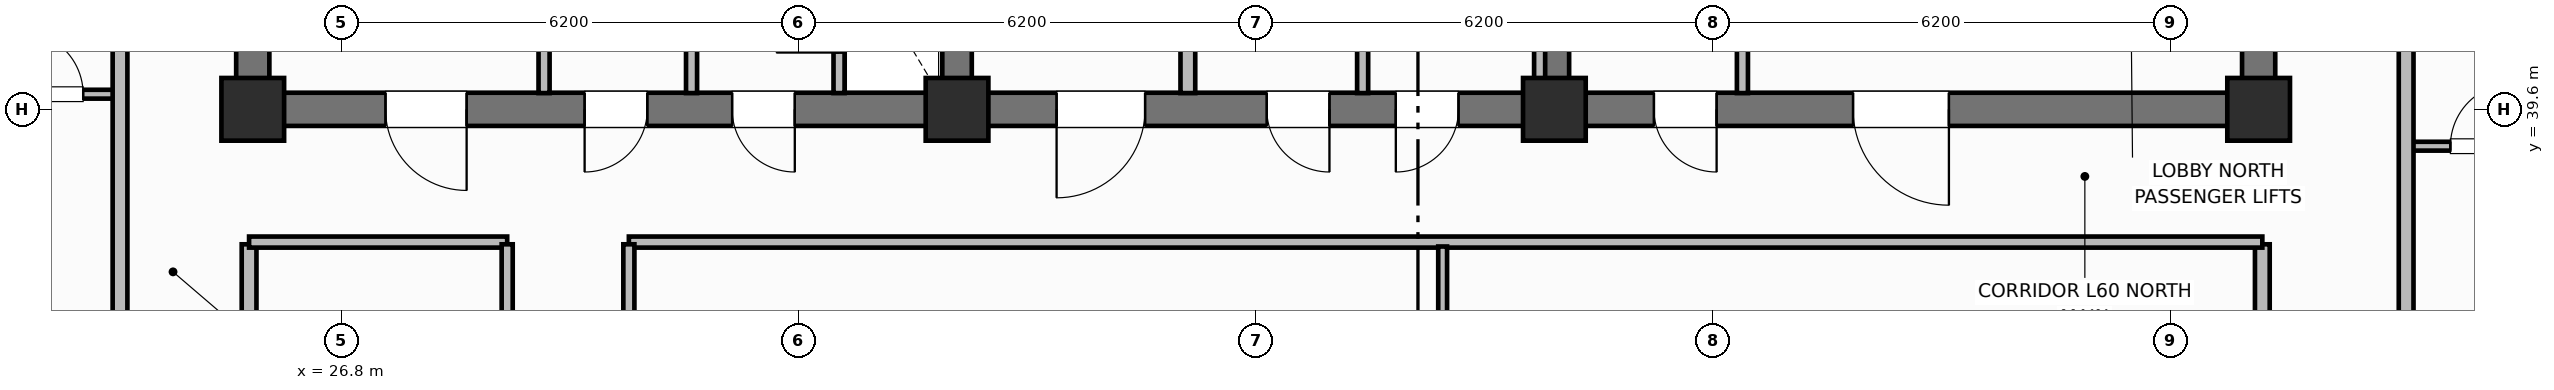
"""IFC4 building model, lengths in metres.
Left out: names, types, materials, properties, quantities, classifications, styles, units other than length and angle.
Written with IfcOpenShell. Run it as: python <this file> out.ifc"""

import sys

from ifc_helpers import new_model, si_unit, direction, frame, frame_2d, origin, origin_2d, place, context, subcontext, project, spatial, rectangle, extrude, element, fill, save


model = new_model("IFC4")
c1 = context("Model", 3, precision=1e-05, world=origin(), true_north=direction((0.0, 1.0)))
c2 = subcontext(c1, "Body", "Model", "MODEL_VIEW")
j1 = project(units=[si_unit("LENGTHUNIT", "METRE"), si_unit("PLANEANGLEUNIT", "RADIAN")], contexts=[c1])
p1 = place(None, origin())
s1 = spatial("IfcSite", under=j1, at=p1, CompositionType="ELEMENT")
p2 = place(p1, origin())
s2 = spatial("IfcBuilding", under=s1, at=p2, CompositionType="ELEMENT")
p3 = place(p2, frame((0.0, 0.0, 240.6)))
s3 = spatial("IfcBuildingStorey", under=s2, at=p3, CompositionType="ELEMENT", Elevation=240.6)
for number, where, z_axis, x_axis in (
    (1, (25.6, 39.825, 0.0), (0.0, 0.0, 1.0), (0.0, 1.0, 0.0)),
    (2, (52.8, 39.825, 0.0), (0.0, 0.0, 1.0), (0.0, 1.0, 0.0)),
):
    element("IfcWall", number, at=place(p3, frame(where, z_axis=z_axis, x_axis=x_axis)), inside=s3, PredefinedType="SHEAR", context=c2, shape_type="SweptSolid", body=[
        extrude(rectangle(XDim=5.75, YDim=0.45, at=frame_2d((2.875, 0.0))), origin(), (0.0, 0.0, 1.0), 3.7),
    ])
p4 = place(p3, frame((52.8, 39.6, 0.0), z_axis=(0.0, 0.0, 1.0), x_axis=(-1.0, 0.0, 0.0)))
e3 = element("IfcWall", 3, at=p4, inside=s3, PredefinedType="SHEAR", context=c2, shape_type="SweptSolid", body=[
    extrude(rectangle(XDim=27.2, YDim=0.45, at=frame_2d((13.6, 0.0))), origin(), (0.0, 0.0, 1.0), 3.7),
])
p5 = place(p4, frame((24.3, 0.0, 0.0)))
e4 = element("IfcOpeningElement", 4, at=p5, cuts=e3, PredefinedType="OPENING", context=c2, shape_type="SweptSolid", body=[
    extrude(rectangle(XDim=1.1, YDim=2.15, at=frame_2d((0.55, 1.075))), frame((0.0, 0.235, 0.0), z_axis=(0.0, -1.0, 0.0), x_axis=(1.0, 0.0, 0.0)), (0.0, 0.0, 1.0), 0.47),
])
p6 = place(p4, frame((21.85, 0.0, 0.0)))
e5 = element("IfcOpeningElement", 5, at=p6, cuts=e3, PredefinedType="OPENING", context=c2, shape_type="SweptSolid", body=[
    extrude(rectangle(XDim=0.85, YDim=2.1, at=frame_2d((0.425, 1.05))), frame((0.0, 0.235, 0.0), z_axis=(0.0, -1.0, 0.0), x_axis=(1.0, 0.0, 0.0)), (0.0, 0.0, 1.0), 0.47),
])
p7 = place(p4, frame((19.85, 0.0, 0.0)))
e6 = element("IfcOpeningElement", 6, at=p7, cuts=e3, PredefinedType="OPENING", context=c2, shape_type="SweptSolid", body=[
    extrude(rectangle(XDim=0.85, YDim=2.1, at=frame_2d((0.425, 1.05))), frame((0.0, 0.235, 0.0), z_axis=(0.0, -1.0, 0.0), x_axis=(1.0, 0.0, 0.0)), (0.0, 0.0, 1.0), 0.47),
])
p8 = place(p4, frame((15.1, 0.0, 0.0)))
e7 = element("IfcOpeningElement", 7, at=p8, cuts=e3, PredefinedType="OPENING", context=c2, shape_type="SweptSolid", body=[
    extrude(rectangle(XDim=1.2, YDim=2.15, at=frame_2d((0.6, 1.075))), frame((0.0, 0.235, 0.0), z_axis=(0.0, -1.0, 0.0), x_axis=(1.0, 0.0, 0.0)), (0.0, 0.0, 1.0), 0.47),
])
p9 = place(p4, frame((12.6, 0.0, 0.0)))
e8 = element("IfcOpeningElement", 8, at=p9, cuts=e3, PredefinedType="OPENING", context=c2, shape_type="SweptSolid", body=[
    extrude(rectangle(XDim=0.85, YDim=2.1, at=frame_2d((0.425, 1.05))), frame((0.0, 0.235, 0.0), z_axis=(0.0, -1.0, 0.0), x_axis=(1.0, 0.0, 0.0)), (0.0, 0.0, 1.0), 0.47),
])
p10 = place(p4, frame((10.85, 0.0, 0.0)))
e9 = element("IfcOpeningElement", 9, at=p10, cuts=e3, PredefinedType="OPENING", context=c2, shape_type="SweptSolid", body=[
    extrude(rectangle(XDim=0.85, YDim=2.1, at=frame_2d((0.425, 1.05))), frame((0.0, 0.235, 0.0), z_axis=(0.0, -1.0, 0.0), x_axis=(1.0, 0.0, 0.0)), (0.0, 0.0, 1.0), 0.47),
])
p11 = place(p4, frame((7.35, 0.0, 0.0)))
e10 = element("IfcOpeningElement", 10, at=p11, cuts=e3, PredefinedType="OPENING", context=c2, shape_type="SweptSolid", body=[
    extrude(rectangle(XDim=0.85, YDim=2.1, at=frame_2d((0.425, 1.05))), frame((0.0, 0.235, 0.0), z_axis=(0.0, -1.0, 0.0), x_axis=(1.0, 0.0, 0.0)), (0.0, 0.0, 1.0), 0.47),
])
p12 = place(p4, frame((4.2, 0.0, 0.0)))
e11 = element("IfcOpeningElement", 11, at=p12, cuts=e3, PredefinedType="OPENING", context=c2, shape_type="SweptSolid", body=[
    extrude(rectangle(XDim=1.3, YDim=2.2, at=frame_2d((0.65, 1.1))), frame((0.0, 0.235, 0.0), z_axis=(0.0, -1.0, 0.0), x_axis=(1.0, 0.0, 0.0)), (0.0, 0.0, 1.0), 0.47),
])
for number, where, z_axis, x_axis in (
    (12, (35.15, 39.825, 0.0), (0.0, 0.0, 1.0), (0.0, 1.0, 0.0)),
    (13, (43.25, 39.825, 0.0), (0.0, 0.0, 1.0), (0.0, 1.0, 0.0)),
):
    element("IfcWall", number, at=place(p3, frame(where, z_axis=z_axis, x_axis=x_axis)), inside=s3, PredefinedType="SHEAR", context=c2, shape_type="SweptSolid", body=[
        extrude(rectangle(XDim=5.75, YDim=0.4, at=frame_2d((2.875, 0.0))), origin(), (0.0, 0.0, 1.0), 3.7),
    ])
for number, where, z_axis, x_axis in (
    (14, (25.6, 39.6, 0.0), (0.0, 0.0, 1.0), (1.0, 0.0, 0.0)),
    (15, (35.15, 39.6, 0.0), (0.0, 0.0, 1.0), (1.0, 0.0, 0.0)),
    (16, (43.25, 39.6, 0.0), (0.0, 0.0, 1.0), (1.0, 0.0, 0.0)),
    (17, (52.8, 39.6, 0.0), (0.0, 0.0, 1.0), (1.0, 0.0, 0.0)),
):
    element("IfcColumn", number, at=place(p3, frame(where, z_axis=z_axis, x_axis=x_axis)), inside=s3, PredefinedType="COLUMN", context=c2, shape_type="SweptSolid", body=[
        extrude(rectangle(XDim=0.85, YDim=0.85, at=origin_2d()), origin(), (0.0, 0.0, 1.0), 3.7),
    ])
p13 = place(p3, frame((33.55, 39.82, 0.0), z_axis=(0.0, 0.0, 1.0), x_axis=(0.0, 1.0, 0.0)))
e18 = element("IfcWall", 18, at=p13, inside=s3, PredefinedType="PARTITIONING", context=c2, shape_type="SweptSolid", body=[
    extrude(rectangle(XDim=2.13, YDim=0.15, at=frame_2d((1.065, 0.0))), origin(), (0.0, 0.0, 1.0), 2.56),
])
p14 = place(p13, frame((0.55, 0.0, 0.0)))
e19 = element("IfcOpeningElement", 19, at=p14, cuts=e18, PredefinedType="OPENING", context=c2, shape_type="SweptSolid", body=[
    extrude(rectangle(XDim=0.85, YDim=2.05, at=frame_2d((0.425, 1.025))), frame((0.0, 0.085, 0.0), z_axis=(0.0, -1.0, 0.0), x_axis=(1.0, 0.0, 0.0)), (0.0, 0.0, 1.0), 0.17),
])
for number, where, z_axis, x_axis in (
    (20, (29.55, 39.82, 0.0), (0.0, 0.0, 1.0), (0.0, 1.0, 0.0)),
    (21, (31.55, 39.82, 0.0), (0.0, 0.0, 1.0), (0.0, 1.0, 0.0)),
):
    element("IfcWall", number, at=place(p3, frame(where, z_axis=z_axis, x_axis=x_axis)), inside=s3, PredefinedType="PARTITIONING", context=c2, shape_type="SweptSolid", body=[
        extrude(rectangle(XDim=2.13, YDim=0.15, at=frame_2d((1.065, 0.0))), origin(), (0.0, 0.0, 1.0), 2.56),
    ])
p15 = place(p3, frame((38.28, 39.82, 0.0), z_axis=(0.0, 0.0, 1.0), x_axis=(0.0, 1.0, 0.0)))
e22 = element("IfcWall", 22, at=p15, inside=s3, PredefinedType="PARTITIONING", context=c2, shape_type="SweptSolid", body=[
    extrude(rectangle(XDim=5.63, YDim=0.2, at=frame_2d((2.815, 0.0))), origin(), (0.0, 0.0, 1.0), 2.56),
])
for number, where, z_axis, x_axis in (
    (23, (43.05, 39.82, 0.0), (0.0, 0.0, 1.0), (0.0, 1.0, 0.0)),
    (24, (40.65, 39.82, 0.0), (0.0, 0.0, 1.0), (0.0, 1.0, 0.0)),
    (25, (45.8, 39.82, 0.0), (0.0, 0.0, 1.0), (0.0, 1.0, 0.0)),
):
    element("IfcWall", number, at=place(p3, frame(where, z_axis=z_axis, x_axis=x_axis)), inside=s3, PredefinedType="PARTITIONING", context=c2, shape_type="SweptSolid", body=[
        extrude(rectangle(XDim=5.63, YDim=0.15, at=frame_2d((2.815, 0.0))), origin(), (0.0, 0.0, 1.0), 2.56),
    ])
for number, where, z_axis, x_axis in (
    (26, (25.55, 18.63, 0.0), (0.0, 0.0, 1.0), (0.0, 1.0, 0.0)),
    (27, (52.85, 18.63, 0.0), (0.0, 0.0, 1.0), (0.0, 1.0, 0.0)),
):
    element("IfcWall", number, at=place(p3, frame(where, z_axis=z_axis, x_axis=x_axis)), inside=s3, PredefinedType="PARTITIONING", context=c2, shape_type="SweptSolid", body=[
        extrude(rectangle(XDim=19.14, YDim=0.2, at=frame_2d((9.57, 0.0))), origin(), (0.0, 0.0, 1.0), 2.56),
    ])
p16 = place(p3, frame((25.55, 37.8, 0.0), z_axis=(0.0, 0.0, 1.0), x_axis=(1.0, 0.0, 0.0)))
e28 = element("IfcWall", 28, at=p16, inside=s3, PredefinedType="PARTITIONING", context=c2, shape_type="SweptSolid", body=[
    extrude(rectangle(XDim=3.5, YDim=0.15, at=frame_2d((1.75, 0.0))), origin(), (0.0, 0.0, 1.0), 2.56),
])
p17 = place(p3, frame((30.7, 37.8, 0.0), z_axis=(0.0, 0.0, 1.0), x_axis=(1.0, 0.0, 0.0)))
e29 = element("IfcWall", 29, at=p17, inside=s3, PredefinedType="PARTITIONING", context=c2, shape_type="SweptSolid", body=[
    extrude(rectangle(XDim=22.15, YDim=0.15, at=frame_2d((11.075, 0.0))), origin(), (0.0, 0.0, 1.0), 2.56),
])
p18 = place(p3, frame((41.735, 29.388, 0.0), z_axis=(0.0, 0.0, 1.0), x_axis=(0.0, 1.0, 0.0)))
e30 = element("IfcWall", 30, at=p18, inside=s3, PredefinedType="PARTITIONING", context=c2, shape_type="SweptSolid", body=[
    extrude(rectangle(XDim=8.352, YDim=0.12, at=frame_2d((4.176, 0.0))), origin(), (0.0, 0.0, 1.0), 2.56),
])
p19 = place(p18, frame((2.0, 0.0, 0.0)))
e31 = element("IfcOpeningElement", 31, at=p19, cuts=e30, PredefinedType="OPENING", context=c2, shape_type="SweptSolid", body=[
    extrude(rectangle(XDim=0.9, YDim=2.1, at=frame_2d((0.45, 1.05))), frame((0.0, 0.07, 0.0), z_axis=(0.0, -1.0, 0.0), x_axis=(1.0, 0.0, 0.0)), (0.0, 0.0, 1.0), 0.14),
])
p20 = place(p3, frame((29.05, 18.63, 0.0), z_axis=(0.0, 0.0, 1.0), x_axis=(0.0, 1.0, 0.0)))
e32 = element("IfcWall", 32, at=p20, inside=s3, PredefinedType="PARTITIONING", context=c2, shape_type="SweptSolid", body=[
    extrude(rectangle(XDim=19.14, YDim=0.15, at=frame_2d((9.57, 0.0))), origin(), (0.0, 0.0, 1.0), 2.56),
])
p21 = place(p20, frame((5.5, 0.0, 0.0)))
e33 = element("IfcOpeningElement", 33, at=p21, cuts=e32, PredefinedType="OPENING", context=c2, shape_type="SweptSolid", body=[
    extrude(rectangle(XDim=1.0, YDim=2.15, at=frame_2d((0.5, 1.075))), frame((0.0, 0.085, 0.0), z_axis=(0.0, -1.0, 0.0), x_axis=(1.0, 0.0, 0.0)), (0.0, 0.0, 1.0), 0.17),
])
p22 = place(p3, frame((30.7, 18.63, 0.0), z_axis=(0.0, 0.0, 1.0), x_axis=(0.0, 1.0, 0.0)))
e34 = element("IfcWall", 34, at=p22, inside=s3, PredefinedType="PARTITIONING", context=c2, shape_type="SweptSolid", body=[
    extrude(rectangle(XDim=19.14, YDim=0.15, at=frame_2d((9.57, 0.0))), origin(), (0.0, 0.0, 1.0), 2.56),
])
p23 = place(p22, frame((2.2, 0.0, 0.0)))
e35 = element("IfcOpeningElement", 35, at=p23, cuts=e34, PredefinedType="OPENING", context=c2, shape_type="SweptSolid", body=[
    extrude(rectangle(XDim=1.0, YDim=2.15, at=frame_2d((0.5, 1.075))), frame((0.0, 0.085, 0.0), z_axis=(0.0, -1.0, 0.0), x_axis=(1.0, 0.0, 0.0)), (0.0, 0.0, 1.0), 0.17),
])
p24 = place(p22, frame((12.719, 0.0, 0.0)))
e36 = element("IfcOpeningElement", 36, at=p24, cuts=e34, PredefinedType="OPENING", context=c2, shape_type="SweptSolid", body=[
    extrude(rectangle(XDim=1.0, YDim=2.15, at=frame_2d((0.5, 1.075))), frame((0.0, 0.085, 0.0), z_axis=(0.0, -1.0, 0.0), x_axis=(1.0, 0.0, 0.0)), (0.0, 0.0, 1.0), 0.17),
])
p25 = place(p3, frame((21.85, 39.805, 0.0), z_axis=(0.0, 0.0, 1.0), x_axis=(1.0, 0.0, 0.0)))
e37 = element("IfcWall", 37, at=p25, inside=s3, PredefinedType="PARTITIONING", context=c2, shape_type="SweptSolid", body=[
    extrude(rectangle(XDim=1.95, YDim=0.12, at=frame_2d((0.975, 0.0))), origin(), (0.0, 0.0, 1.0), 2.56),
])
p26 = place(p25, frame((0.6, 0.0, 0.0)))
e38 = element("IfcOpeningElement", 38, at=p26, cuts=e37, PredefinedType="OPENING", context=c2, shape_type="SweptSolid", body=[
    extrude(rectangle(XDim=0.85, YDim=2.1, at=frame_2d((0.425, 1.05))), frame((0.0, 0.07, 0.0), z_axis=(0.0, -1.0, 0.0), x_axis=(1.0, 0.0, 0.0)), (0.0, 0.0, 1.0), 0.14),
])
p27 = place(p3, frame((23.8, 9.95, 0.0), z_axis=(0.0, 0.0, 1.0), x_axis=(0.0, 1.0, 0.0)))
e39 = element("IfcWall", 39, at=p27, inside=s3, PredefinedType="PARTITIONING", context=c2, shape_type="SweptSolid", body=[
    extrude(rectangle(XDim=36.5, YDim=0.2, at=frame_2d((18.25, 0.0))), origin(), (0.0, 0.0, 1.0), 2.56),
])
p28 = place(p27, frame((3.25, 0.0, 0.0)))
e40 = element("IfcOpeningElement", 40, at=p28, cuts=e39, PredefinedType="OPENING", context=c2, shape_type="SweptSolid", body=[
    extrude(rectangle(XDim=1.0, YDim=2.15, at=frame_2d((0.5, 1.075))), frame((0.0, 0.11, 0.0), z_axis=(0.0, -1.0, 0.0), x_axis=(1.0, 0.0, 0.0)), (0.0, 0.0, 1.0), 0.22),
])
p29 = place(p27, frame((13.3, 0.0, 0.0)))
e41 = element("IfcOpeningElement", 41, at=p29, cuts=e39, PredefinedType="OPENING", context=c2, shape_type="SweptSolid", body=[
    extrude(rectangle(XDim=1.0, YDim=2.15, at=frame_2d((0.5, 1.075))), frame((0.0, 0.11, 0.0), z_axis=(0.0, -1.0, 0.0), x_axis=(1.0, 0.0, 0.0)), (0.0, 0.0, 1.0), 0.22),
])
p30 = place(p27, frame((25.005, 0.0, 0.0)))
e42 = element("IfcOpeningElement", 42, at=p30, cuts=e39, PredefinedType="OPENING", context=c2, shape_type="SweptSolid", body=[
    extrude(rectangle(XDim=1.0, YDim=2.15, at=frame_2d((0.5, 1.075))), frame((0.0, 0.11, 0.0), z_axis=(0.0, -1.0, 0.0), x_axis=(1.0, 0.0, 0.0)), (0.0, 0.0, 1.0), 0.22),
])
p31 = place(p3, frame((54.8, 39.1, 0.0), z_axis=(0.0, 0.0, 1.0), x_axis=(1.0, 0.0, 0.0)))
e43 = element("IfcWall", 43, at=p31, inside=s3, PredefinedType="PARTITIONING", context=c2, shape_type="SweptSolid", body=[
    extrude(rectangle(XDim=1.95, YDim=0.12, at=frame_2d((0.975, 0.0))), origin(), (0.0, 0.0, 1.0), 2.56),
])
p32 = place(p31, frame((0.6, 0.0, 0.0)))
e44 = element("IfcOpeningElement", 44, at=p32, cuts=e43, PredefinedType="OPENING", context=c2, shape_type="SweptSolid", body=[
    extrude(rectangle(XDim=0.85, YDim=2.1, at=frame_2d((0.425, 1.05))), frame((0.0, 0.07, 0.0), z_axis=(0.0, -1.0, 0.0), x_axis=(1.0, 0.0, 0.0)), (0.0, 0.0, 1.0), 0.14),
])
p33 = place(p3, frame((54.8, 9.95, 0.0), z_axis=(0.0, 0.0, 1.0), x_axis=(0.0, 1.0, 0.0)))
e45 = element("IfcWall", 45, at=p33, inside=s3, PredefinedType="PARTITIONING", context=c2, shape_type="SweptSolid", body=[
    extrude(rectangle(XDim=36.5, YDim=0.2, at=frame_2d((18.25, 0.0))), origin(), (0.0, 0.0, 1.0), 2.56),
])
p34 = place(p33, frame((3.25, 0.0, 0.0)))
e46 = element("IfcOpeningElement", 46, at=p34, cuts=e45, PredefinedType="OPENING", context=c2, shape_type="SweptSolid", body=[
    extrude(rectangle(XDim=1.0, YDim=2.15, at=frame_2d((0.5, 1.075))), frame((0.0, 0.11, 0.0), z_axis=(0.0, -1.0, 0.0), x_axis=(1.0, 0.0, 0.0)), (0.0, 0.0, 1.0), 0.22),
])
p35 = place(p33, frame((12.96, 0.0, 0.0)))
e47 = element("IfcOpeningElement", 47, at=p35, cuts=e45, PredefinedType="OPENING", context=c2, shape_type="SweptSolid", body=[
    extrude(rectangle(XDim=1.0, YDim=2.15, at=frame_2d((0.5, 1.075))), frame((0.0, 0.11, 0.0), z_axis=(0.0, -1.0, 0.0), x_axis=(1.0, 0.0, 0.0)), (0.0, 0.0, 1.0), 0.22),
])
p36 = place(p33, frame((24.3, 0.0, 0.0)))
e48 = element("IfcOpeningElement", 48, at=p36, cuts=e45, PredefinedType="OPENING", context=c2, shape_type="SweptSolid", body=[
    extrude(rectangle(XDim=1.0, YDim=2.15, at=frame_2d((0.5, 1.075))), frame((0.0, 0.11, 0.0), z_axis=(0.0, -1.0, 0.0), x_axis=(1.0, 0.0, 0.0)), (0.0, 0.0, 1.0), 0.22),
])
p37 = place(p14, origin())
e49 = element("IfcDoor", 49, at=p37, inside=s3, OperationType="SINGLE_SWING_LEFT", PredefinedType="TRAPDOOR", context=c2, shape_type="SweptSolid", body=[
    extrude(rectangle(XDim=0.85, YDim=2.05, at=frame_2d((0.425, 1.025))), frame((0.0, 0.025, 0.0), z_axis=(0.0, -1.0, 0.0), x_axis=(1.0, 0.0, 0.0)), (0.0, 0.0, 1.0), 0.05),
])
fill(e19, e49)
p38 = place(p26, origin())
e50 = element("IfcDoor", 50, at=p38, inside=s3, OperationType="SINGLE_SWING_LEFT", PredefinedType="DOOR", context=c2, shape_type="SweptSolid", body=[
    extrude(rectangle(XDim=0.85, YDim=2.1, at=frame_2d((0.425, 1.05))), frame((0.0, 0.025, 0.0), z_axis=(0.0, -1.0, 0.0), x_axis=(1.0, 0.0, 0.0)), (0.0, 0.0, 1.0), 0.05),
])
fill(e38, e50)
p39 = place(p32, origin())
e51 = element("IfcDoor", 51, at=p39, inside=s3, OperationType="SINGLE_SWING_RIGHT", PredefinedType="DOOR", context=c2, shape_type="SweptSolid", body=[
    extrude(rectangle(XDim=0.85, YDim=2.1, at=frame_2d((0.425, 1.05))), frame((0.0, 0.025, 0.0), z_axis=(0.0, -1.0, 0.0), x_axis=(1.0, 0.0, 0.0)), (0.0, 0.0, 1.0), 0.05),
])
fill(e44, e51)
p40 = place(p5, origin())
e52 = element("IfcDoor", 52, at=p40, inside=s3, OperationType="SINGLE_SWING_LEFT", PredefinedType="DOOR", context=c2, shape_type="SweptSolid", body=[
    extrude(rectangle(XDim=1.1, YDim=2.15, at=frame_2d((0.55, 1.075))), frame((0.0, 0.025, 0.0), z_axis=(0.0, -1.0, 0.0), x_axis=(1.0, 0.0, 0.0)), (0.0, 0.0, 1.0), 0.05),
])
fill(e4, e52)
p41 = place(p6, origin())
e53 = element("IfcDoor", 53, at=p41, inside=s3, OperationType="SINGLE_SWING_RIGHT", PredefinedType="DOOR", context=c2, shape_type="SweptSolid", body=[
    extrude(rectangle(XDim=0.85, YDim=2.1, at=frame_2d((0.425, 1.05))), frame((0.0, 0.025, 0.0), z_axis=(0.0, -1.0, 0.0), x_axis=(1.0, 0.0, 0.0)), (0.0, 0.0, 1.0), 0.05),
])
fill(e5, e53)
p42 = place(p7, origin())
e54 = element("IfcDoor", 54, at=p42, inside=s3, OperationType="SINGLE_SWING_LEFT", PredefinedType="DOOR", context=c2, shape_type="SweptSolid", body=[
    extrude(rectangle(XDim=0.85, YDim=2.1, at=frame_2d((0.425, 1.05))), frame((0.0, 0.025, 0.0), z_axis=(0.0, -1.0, 0.0), x_axis=(1.0, 0.0, 0.0)), (0.0, 0.0, 1.0), 0.05),
])
fill(e6, e54)
p43 = place(p8, origin())
e55 = element("IfcDoor", 55, at=p43, inside=s3, OperationType="SINGLE_SWING_RIGHT", PredefinedType="DOOR", context=c2, shape_type="SweptSolid", body=[
    extrude(rectangle(XDim=1.2, YDim=2.15, at=frame_2d((0.6, 1.075))), frame((0.0, 0.025, 0.0), z_axis=(0.0, -1.0, 0.0), x_axis=(1.0, 0.0, 0.0)), (0.0, 0.0, 1.0), 0.05),
])
fill(e7, e55)
p44 = place(p9, origin())
e56 = element("IfcDoor", 56, at=p44, inside=s3, OperationType="SINGLE_SWING_LEFT", PredefinedType="DOOR", context=c2, shape_type="SweptSolid", body=[
    extrude(rectangle(XDim=0.85, YDim=2.1, at=frame_2d((0.425, 1.05))), frame((0.0, 0.025, 0.0), z_axis=(0.0, -1.0, 0.0), x_axis=(1.0, 0.0, 0.0)), (0.0, 0.0, 1.0), 0.05),
])
fill(e8, e56)
p45 = place(p10, origin())
e57 = element("IfcDoor", 57, at=p45, inside=s3, OperationType="SINGLE_SWING_RIGHT", PredefinedType="DOOR", context=c2, shape_type="SweptSolid", body=[
    extrude(rectangle(XDim=0.85, YDim=2.1, at=frame_2d((0.425, 1.05))), frame((0.0, 0.025, 0.0), z_axis=(0.0, -1.0, 0.0), x_axis=(1.0, 0.0, 0.0)), (0.0, 0.0, 1.0), 0.05),
])
fill(e9, e57)
p46 = place(p11, origin())
e58 = element("IfcDoor", 58, at=p46, inside=s3, OperationType="SINGLE_SWING_LEFT", PredefinedType="DOOR", context=c2, shape_type="SweptSolid", body=[
    extrude(rectangle(XDim=0.85, YDim=2.1, at=frame_2d((0.425, 1.05))), frame((0.0, 0.025, 0.0), z_axis=(0.0, -1.0, 0.0), x_axis=(1.0, 0.0, 0.0)), (0.0, 0.0, 1.0), 0.05),
])
fill(e10, e58)
p47 = place(p12, origin())
e59 = element("IfcDoor", 59, at=p47, inside=s3, OperationType="SINGLE_SWING_LEFT", PredefinedType="DOOR", context=c2, shape_type="SweptSolid", body=[
    extrude(rectangle(XDim=1.3, YDim=2.2, at=frame_2d((0.65, 1.1))), frame((0.0, 0.025, 0.0), z_axis=(0.0, -1.0, 0.0), x_axis=(1.0, 0.0, 0.0)), (0.0, 0.0, 1.0), 0.05),
])
fill(e11, e59)
save(model, sys.argv[1])
